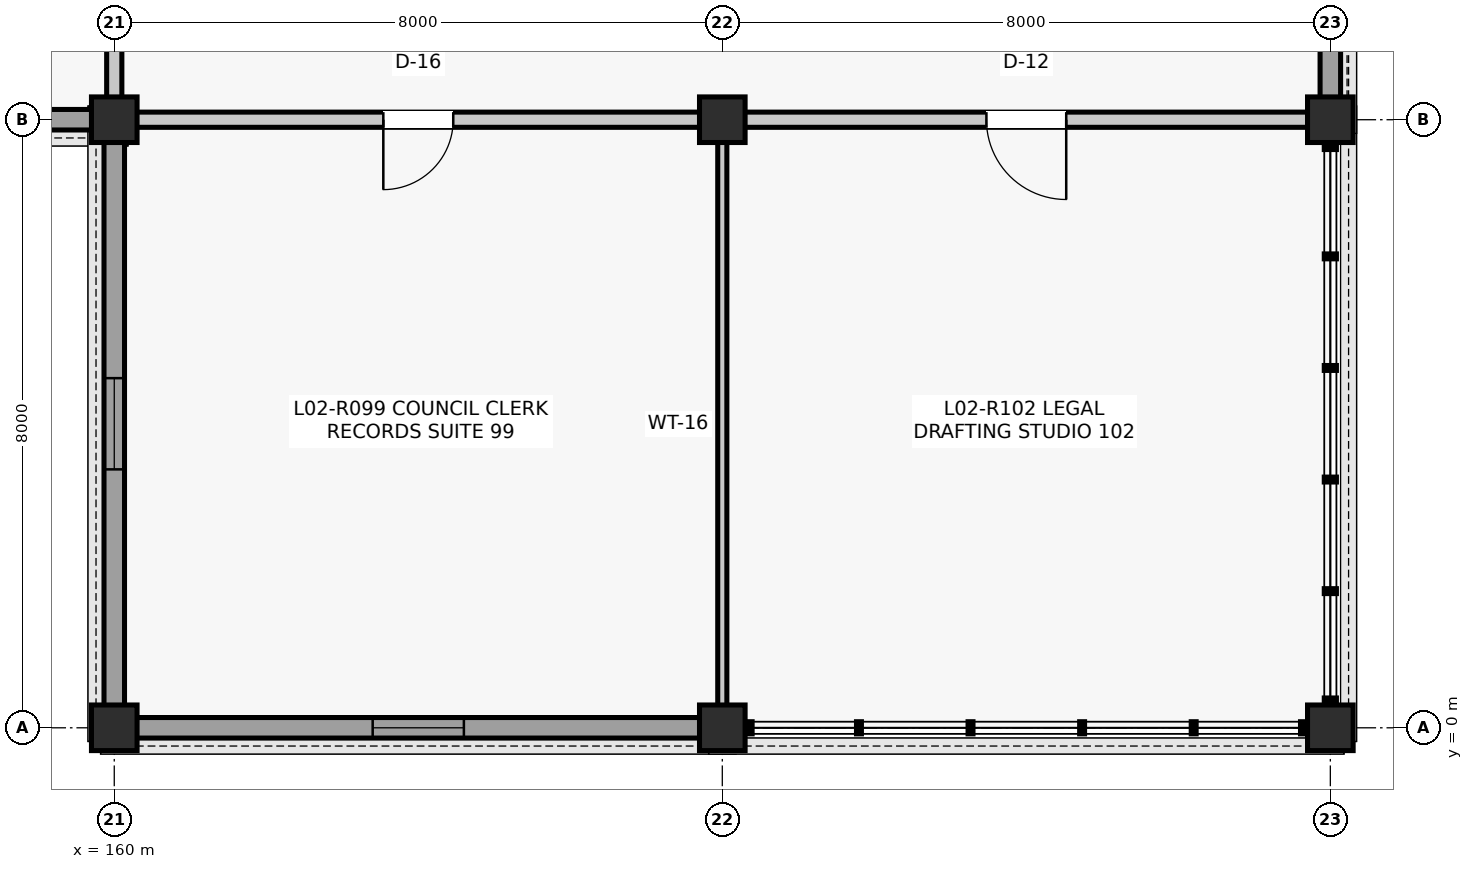
"""IFC4 building model, lengths in metres.
Left out: names, types, materials, properties, quantities, classifications, styles, units other than length and angle.
Written with IfcOpenShell. Run it as: python <this file> out.ifc"""

import sys

from ifc_helpers import new_model, si_unit, direction, frame, frame_2d, origin, origin_2d, place, context, subcontext, project, spatial, rectangle, extrude, element, fill, save


model = new_model("IFC4")
c1 = context("Model", 3, precision=1e-05, world=origin(), true_north=direction((0.0, 1.0)))
c2 = subcontext(c1, "Body", "Model", "MODEL_VIEW")
j1 = project(units=[si_unit("LENGTHUNIT", "METRE"), si_unit("PLANEANGLEUNIT", "RADIAN")], contexts=[c1])
p1 = place(None, origin())
s1 = spatial("IfcSite", under=j1, at=p1, CompositionType="ELEMENT")
p2 = place(p1, origin())
s2 = spatial("IfcBuilding", under=s1, at=p2, CompositionType="ELEMENT")
p3 = place(p2, frame((0.0, 0.0, 9.9)))
s3 = spatial("IfcBuildingStorey", under=s2, at=p3, CompositionType="ELEMENT", Elevation=9.9)
for number, where, z_axis, x_axis in (
    (1, (160.0, 0.0, 0.0), (0.0, 0.0, 1.0), (1.0, 0.0, 0.0)),
    (2, (160.0, 8.0, 0.0), (0.0, 0.0, 1.0), (1.0, 0.0, 0.0)),
    (3, (168.0, 0.0, 0.0), (0.0, 0.0, 1.0), (1.0, 0.0, 0.0)),
    (4, (168.0, 8.0, 0.0), (0.0, 0.0, 1.0), (1.0, 0.0, 0.0)),
    (5, (176.0, 0.0, 0.0), (0.0, 0.0, 1.0), (1.0, 0.0, 0.0)),
    (6, (176.0, 8.0, 0.0), (0.0, 0.0, 1.0), (1.0, 0.0, 0.0)),
):
    element("IfcColumn", number, at=place(p3, frame(where, z_axis=z_axis, x_axis=x_axis)), inside=s3, PredefinedType="COLUMN", context=c2, shape_type="SweptSolid", body=[
        extrude(rectangle(XDim=0.6, YDim=0.6, at=origin_2d()), origin(), (0.0, 0.0, 1.0), 3.96),
    ])
p4 = place(p3, frame((152.285, 8.0, 0.0), z_axis=(0.0, 0.0, 1.0), x_axis=(1.0, 0.0, 0.0)))
e7 = element("IfcWall", 7, at=p4, inside=s3, PredefinedType="SOLIDWALL", context=c2, shape_type="SweptSolid", body=[
    extrude(rectangle(XDim=7.43, YDim=0.27, at=frame_2d((3.715, 0.0))), origin(), (0.0, 0.0, 1.0), 3.284),
])
p5 = place(p4, frame((3.115, 0.0, 0.9)))
e8 = element("IfcOpeningElement", 8, at=p5, cuts=e7, PredefinedType="OPENING", context=c2, shape_type="SweptSolid", body=[
    extrude(rectangle(XDim=1.2, YDim=1.8, at=frame_2d((0.6, 0.9))), frame((0.0, 0.145, 0.0), z_axis=(0.0, -1.0, 0.0), x_axis=(1.0, 0.0, 0.0)), (0.0, 0.0, 1.0), 0.29),
])
p6 = place(p3, frame((160.285, 0.0, 0.0), z_axis=(0.0, 0.0, 1.0), x_axis=(1.0, 0.0, 0.0)))
e9 = element("IfcWall", 9, at=p6, inside=s3, PredefinedType="SOLIDWALL", context=c2, shape_type="SweptSolid", body=[
    extrude(rectangle(XDim=7.43, YDim=0.27, at=frame_2d((3.715, 0.0))), origin(), (0.0, 0.0, 1.0), 3.284),
])
p7 = place(p6, frame((3.115, 0.0, 0.9)))
e10 = element("IfcOpeningElement", 10, at=p7, cuts=e9, PredefinedType="OPENING", context=c2, shape_type="SweptSolid", body=[
    extrude(rectangle(XDim=1.2, YDim=1.8, at=frame_2d((0.6, 0.9))), frame((0.0, 0.145, 0.0), z_axis=(0.0, -1.0, 0.0), x_axis=(1.0, 0.0, 0.0)), (0.0, 0.0, 1.0), 0.29),
])
p8 = place(p3, frame((160.0, 0.285, 0.0), z_axis=(0.0, 0.0, 1.0), x_axis=(0.0, 1.0, 0.0)))
e11 = element("IfcWall", 11, at=p8, inside=s3, PredefinedType="SOLIDWALL", context=c2, shape_type="SweptSolid", body=[
    extrude(rectangle(XDim=7.43, YDim=0.27, at=frame_2d((3.715, 0.0))), origin(), (0.0, 0.0, 1.0), 3.284),
])
p9 = place(p8, frame((3.115, 0.0, 0.9)))
e12 = element("IfcOpeningElement", 12, at=p9, cuts=e11, PredefinedType="OPENING", context=c2, shape_type="SweptSolid", body=[
    extrude(rectangle(XDim=1.2, YDim=1.8, at=frame_2d((0.6, 0.9))), frame((0.0, 0.145, 0.0), z_axis=(0.0, -1.0, 0.0), x_axis=(1.0, 0.0, 0.0)), (0.0, 0.0, 1.0), 0.29),
])
p10 = place(p3, frame((176.0, 8.285, 0.0), z_axis=(0.0, 0.0, 1.0), x_axis=(0.0, 1.0, 0.0)))
e13 = element("IfcWall", 13, at=p10, inside=s3, PredefinedType="SOLIDWALL", context=c2, shape_type="SweptSolid", body=[
    extrude(rectangle(XDim=7.33, YDim=0.27, at=frame_2d((3.665, 0.0))), origin(), (0.0, 0.0, 1.0), 3.344),
])
p11 = place(p10, frame((2.865, 0.0, 0.9)))
e14 = element("IfcOpeningElement", 14, at=p11, cuts=e13, PredefinedType="OPENING", context=c2, shape_type="SweptSolid", body=[
    extrude(rectangle(XDim=1.6, YDim=2.0, at=frame_2d((0.8, 1.0))), frame((0.0, 0.145, 0.0), z_axis=(0.0, -1.0, 0.0), x_axis=(1.0, 0.0, 0.0)), (0.0, 0.0, 1.0), 0.29),
])
p12 = place(p3, frame((160.0, 8.29, 0.0), z_axis=(0.0, 0.0, 1.0), x_axis=(0.0, 1.0, 0.0)))
e15 = element("IfcWall", 15, at=p12, inside=s3, PredefinedType="PARTITIONING", context=c2, shape_type="SweptSolid", body=[
    extrude(rectangle(XDim=7.42, YDim=0.2, at=frame_2d((3.71, 0.0))), origin(), (0.0, 0.0, 1.0), 3.227),
])
p13 = place(p12, frame((3.06, 0.0, 0.0)))
e16 = element("IfcOpeningElement", 16, at=p13, cuts=e15, PredefinedType="OPENING", context=c2, shape_type="SweptSolid", body=[
    extrude(rectangle(XDim=1.3, YDim=2.2, at=frame_2d((0.65, 1.1))), frame((0.0, 0.11, 0.0), z_axis=(0.0, -1.0, 0.0), x_axis=(1.0, 0.0, 0.0)), (0.0, 0.0, 1.0), 0.22),
])
p14 = place(p3, frame((168.0, 0.29, 0.0), z_axis=(0.0, 0.0, 1.0), x_axis=(0.0, 1.0, 0.0)))
e17 = element("IfcWall", 17, at=p14, inside=s3, PredefinedType="PARTITIONING", context=c2, shape_type="SweptSolid", body=[
    extrude(rectangle(XDim=7.42, YDim=0.12, at=frame_2d((3.71, 0.0))), origin(), (0.0, 0.0, 1.0), 3.227),
])
p15 = place(p3, frame((160.29, 8.0, 0.0), z_axis=(0.0, 0.0, 1.0), x_axis=(1.0, 0.0, 0.0)))
e18 = element("IfcWall", 18, at=p15, inside=s3, PredefinedType="PARTITIONING", context=c2, shape_type="SweptSolid", body=[
    extrude(rectangle(XDim=7.42, YDim=0.2, at=frame_2d((3.71, 0.0))), origin(), (0.0, 0.0, 1.0), 3.157),
])
p16 = place(p15, frame((3.25, 0.0, 0.0)))
e19 = element("IfcOpeningElement", 19, at=p16, cuts=e18, PredefinedType="OPENING", context=c2, shape_type="SweptSolid", body=[
    extrude(rectangle(XDim=0.92, YDim=2.1, at=frame_2d((0.46, 1.05))), frame((0.0, 0.11, 0.0), z_axis=(0.0, -1.0, 0.0), x_axis=(1.0, 0.0, 0.0)), (0.0, 0.0, 1.0), 0.22),
])
p17 = place(p3, frame((168.29, 8.0, 0.0), z_axis=(0.0, 0.0, 1.0), x_axis=(1.0, 0.0, 0.0)))
e20 = element("IfcWall", 20, at=p17, inside=s3, PredefinedType="PARTITIONING", context=c2, shape_type="SweptSolid", body=[
    extrude(rectangle(XDim=7.42, YDim=0.2, at=frame_2d((3.71, 0.0))), origin(), (0.0, 0.0, 1.0), 3.141),
])
p18 = place(p17, frame((3.185, 0.0, 0.0)))
e21 = element("IfcOpeningElement", 21, at=p18, cuts=e20, PredefinedType="OPENING", context=c2, shape_type="SweptSolid", body=[
    extrude(rectangle(XDim=1.05, YDim=2.15, at=frame_2d((0.525, 1.075))), frame((0.0, 0.11, 0.0), z_axis=(0.0, -1.0, 0.0), x_axis=(1.0, 0.0, 0.0)), (0.0, 0.0, 1.0), 0.22),
])
p19 = place(p7, origin())
e22 = element("IfcWindow", 22, at=p19, inside=s3, PartitioningType="SINGLE_PANEL", PredefinedType="WINDOW", context=c2, shape_type="SweptSolid", body=[
    extrude(rectangle(XDim=1.2, YDim=1.8, at=frame_2d((0.6, 0.9))), frame((0.0, 0.03, 0.0), z_axis=(0.0, -1.0, 0.0), x_axis=(1.0, 0.0, 0.0)), (0.0, 0.0, 1.0), 0.06),
])
fill(e10, e22)
p20 = place(p9, origin())
e23 = element("IfcWindow", 23, at=p20, inside=s3, PartitioningType="SINGLE_PANEL", PredefinedType="WINDOW", context=c2, shape_type="SweptSolid", body=[
    extrude(rectangle(XDim=1.2, YDim=1.8, at=frame_2d((0.6, 0.9))), frame((0.0, 0.03, 0.0), z_axis=(0.0, -1.0, 0.0), x_axis=(1.0, 0.0, 0.0)), (0.0, 0.0, 1.0), 0.06),
])
fill(e12, e23)
p21 = place(p16, frame((0.92, 0.0, 0.0), z_axis=(0.0, 0.0, 1.0), x_axis=(-1.0, 0.0, 0.0)))
e24 = element("IfcDoor", 24, at=p21, inside=s3, OperationType="SINGLE_SWING_LEFT", PredefinedType="DOOR", context=c2, shape_type="SweptSolid", body=[
    extrude(rectangle(XDim=0.92, YDim=2.1, at=frame_2d((0.46, 1.05))), frame((0.0, 0.025, 0.0), z_axis=(0.0, -1.0, 0.0), x_axis=(1.0, 0.0, 0.0)), (0.0, 0.0, 1.0), 0.05),
])
fill(e19, e24)
p22 = place(p18, frame((1.05, 0.0, 0.0), z_axis=(0.0, 0.0, 1.0), x_axis=(-1.0, 0.0, 0.0)))
e25 = element("IfcDoor", 25, at=p22, inside=s3, OperationType="SINGLE_SWING_RIGHT", PredefinedType="DOOR", context=c2, shape_type="SweptSolid", body=[
    extrude(rectangle(XDim=1.05, YDim=2.15, at=frame_2d((0.525, 1.075))), frame((0.0, 0.025, 0.0), z_axis=(0.0, -1.0, 0.0), x_axis=(1.0, 0.0, 0.0)), (0.0, 0.0, 1.0), 0.05),
])
fill(e21, e25)
save(model, sys.argv[1])
